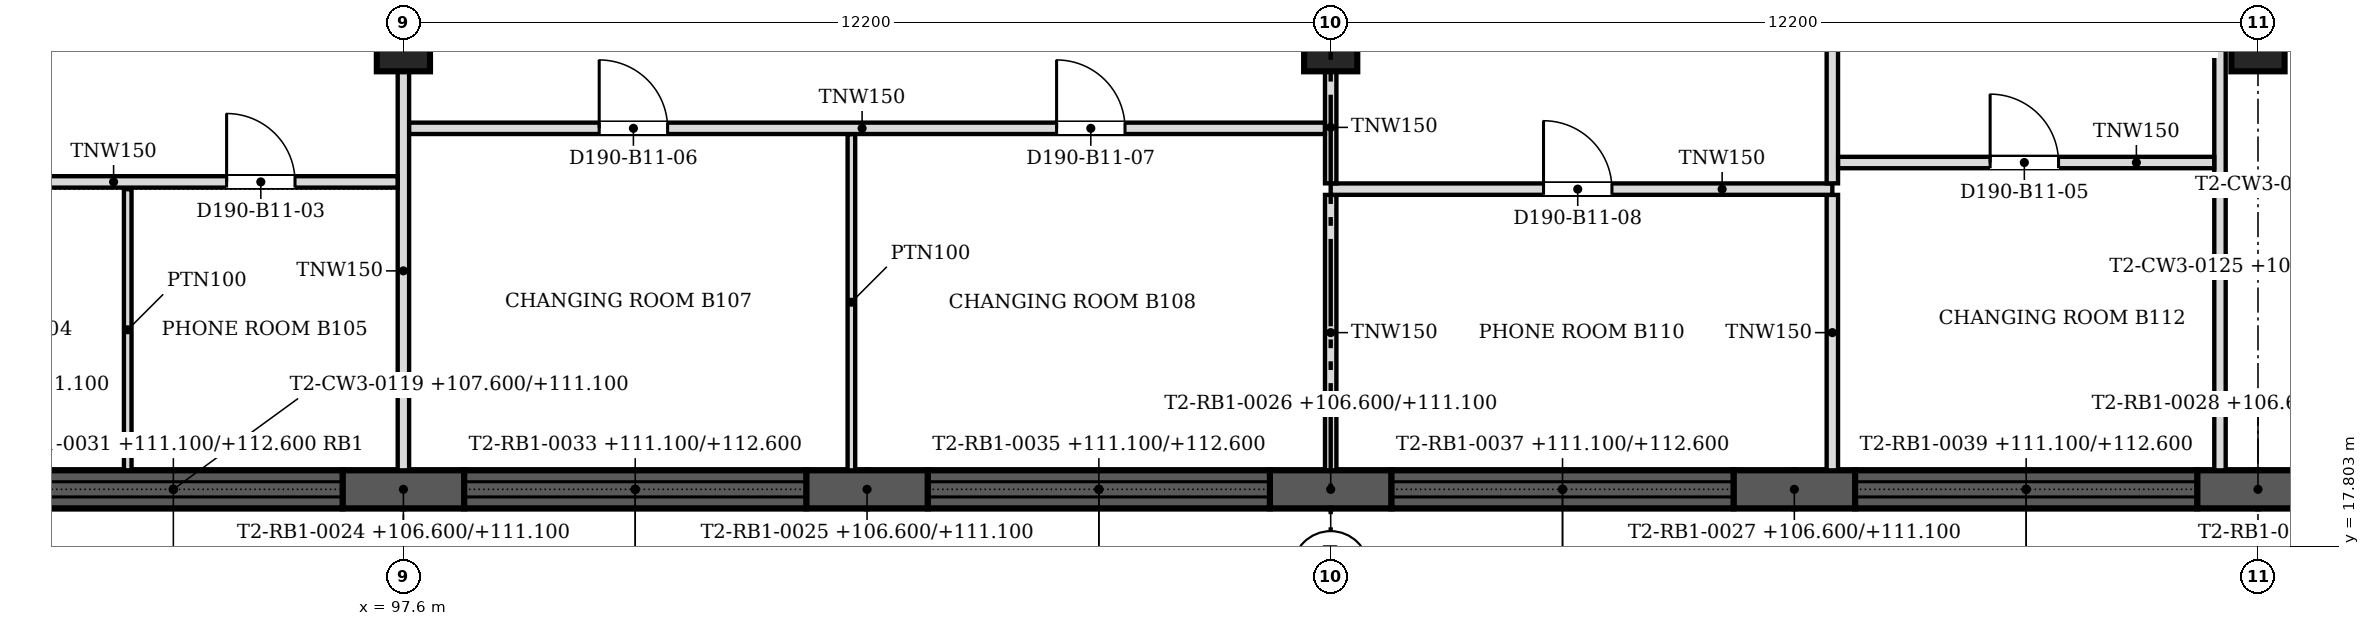
"""IFC4 building model, lengths in metres.
Left out: names, types, materials, properties, quantities, classifications, styles, units other than length and angle.
Written with IfcOpenShell. Run it as: python <this file> out.ifc"""

import sys

from ifc_helpers import new_model, si_unit, direction, frame, frame_2d, origin, origin_2d, place, context, subcontext, project, spatial, polyline, rectangle, outline, extrude, faceted_brep, source, transform, mapped, element, fill, save


model = new_model("IFC4")
c1 = context("Model", 3, precision=1e-05, world=origin(), true_north=direction((0.0, 1.0)))
c2 = subcontext(c1, "Body", "Model", "MODEL_VIEW")
j1 = project(units=[si_unit("LENGTHUNIT", "METRE"), si_unit("PLANEANGLEUNIT", "RADIAN")], contexts=[c1])
p1 = place(None, origin())
s1 = spatial("IfcSite", under=j1, at=p1, CompositionType="ELEMENT")
p2 = place(p1, origin())
s2 = spatial("IfcBuilding", under=s1, at=p2, CompositionType="ELEMENT")
p3 = place(p2, frame((0.0, 0.0, 106.6)))
s3 = spatial("IfcBuildingStorey", under=s2, at=p3, CompositionType="ELEMENT", Elevation=106.6)
for number, where, z_axis, x_axis in (
    (1, (97.6, 24.4, 0.0), (0.0, 0.0, 1.0), (1.0, 0.0, 0.0)),
    (2, (109.8, 24.4, 0.0), (0.0, 0.0, 1.0), (1.0, 0.0, 0.0)),
    (3, (122.0, 24.4, 0.0), (0.0, 0.0, 1.0), (1.0, 0.0, 0.0)),
):
    element("IfcColumn", number, at=place(p3, frame(where, z_axis=z_axis, x_axis=x_axis)), inside=s3, PredefinedType="COLUMN", context=c2, shape_type="SweptSolid", body=[
        extrude(rectangle(XDim=0.7, YDim=0.7, at=origin_2d()), origin(), (0.0, 0.0, 1.0), 5.7),
    ])
m1 = source(origin(), c2, "Body", "Brep", [
    faceted_brep([(0.0, -0.25, 0.0), (1.6, -0.25, 0.0), (1.6, -0.25, 4.5), (0.0, -0.25, 4.5), (0.0, 0.25, 4.5), (1.6, 0.25, 4.5), (1.6, 0.25, 0.0), (0.0, 0.25, 0.0)], [[[0, 1, 2, 3]], [[4, 5, 6, 7]], [[7, 6, 1, 0]], [[5, 4, 3, 2]], [[4, 7, 0, 3]], [[1, 6, 5, 2]]]),
])
p4 = place(p3, frame((96.8, 18.55, 0.0), z_axis=(0.0, 0.0, 1.0), x_axis=(1.0, 0.0, 0.0)))
e4 = element("IfcWall", 4, at=p4, inside=s3, PredefinedType="SOLIDWALL", context=c2, shape_type="MappedRepresentation", body=[
    mapped(m1, transform((0.0, 0.0, 0.0), scale=1.0)),
])
m2 = source(origin(), c2, "Body", "SweptSolid", [
    extrude(outline(polyline([(0.0, 0.0), (1.6, 0.0), (1.6, 4.5), (0.0, 4.5), (0.0, 0.0)])), frame((0.0, 0.25, 0.0), z_axis=(0.0, -1.0, 0.0), x_axis=(1.0, 0.0, 0.0)), (0.0, 0.0, 1.0), 0.5),
])
for number, where, z_axis, x_axis in (
    (5, (102.9, 18.55, 0.0), (0.0, 0.0, 1.0), (1.0, 0.0, 0.0)),
    (6, (109.0, 18.55, 0.0), (0.0, 0.0, 1.0), (1.0, 0.0, 0.0)),
):
    element("IfcWall", number, at=place(p3, frame(where, z_axis=z_axis, x_axis=x_axis)), inside=s3, PredefinedType="SOLIDWALL", context=c2, shape_type="MappedRepresentation", body=[
        mapped(m2, transform((0.0, 0.0, 0.0), scale=1.0)),
    ])
p5 = place(p3, frame((115.1, 18.55, 0.0), z_axis=(0.0, 0.0, 1.0), x_axis=(1.0, 0.0, 0.0)))
e7 = element("IfcWall", 7, at=p5, inside=s3, PredefinedType="SOLIDWALL", context=c2, shape_type="MappedRepresentation", body=[
    mapped(m1, transform((0.0, 0.0, 0.0), scale=1.0)),
])
p6 = place(p3, frame((121.2, 18.55, 0.0), z_axis=(0.0, 0.0, 1.0), x_axis=(1.0, 0.0, 0.0)))
e8 = element("IfcWall", 8, at=p6, inside=s3, PredefinedType="SOLIDWALL", context=c2, shape_type="MappedRepresentation", body=[
    mapped(m2, transform((0.0, 0.0, 0.0), scale=1.0)),
])
m3 = source(origin(), c2, "Body", "SweptSolid", [
    extrude(outline(polyline([(0.0, 0.0), (4.453, 0.0), (4.453, 1.0), (0.0, 1.0), (0.0, 0.0)])), frame((0.0, 0.25, 0.0), z_axis=(0.0, -1.0, 0.0), x_axis=(1.0, 0.0, 0.0)), (0.0, 0.0, 1.0), 0.5),
])
p7 = place(p3, frame((92.346, 18.55, 0.0), z_axis=(0.0, 0.0, 1.0), x_axis=(1.0, 0.0, 0.0)))
e9 = element("IfcWall", 9, at=p7, inside=s3, PredefinedType="SOLIDWALL", context=c2, shape_type="MappedRepresentation", body=[
    mapped(m3, transform((0.0, 0.0, 0.0), scale=1.0)),
])
m4 = source(origin(), c2, "Body", "Brep", [
    faceted_brep([(0.0, -0.25, 0.0), (6.053, -0.25, 0.0), (6.053, -0.25, 1.5), (0.0, -0.25, 1.5), (0.047, 0.25, 1.5), (6.053, 0.25, 1.5), (6.053, 0.25, 0.0), (0.047, 0.25, 0.0), (0.0, 0.0, 0.0), (0.0, 0.0, 1.5)], [[[0, 1, 2, 3]], [[4, 5, 6, 7]], [[7, 6, 1, 0, 8]], [[5, 4, 9, 3, 2]], [[8, 0, 3, 9]], [[7, 8, 9, 4]], [[1, 6, 5, 2]]]),
])
p8 = place(p3, frame((91.547, 18.55, 4.5), z_axis=(0.0, 0.0, 1.0), x_axis=(1.0, 0.0, 0.0)))
e10 = element("IfcWall", 10, at=p8, inside=s3, PredefinedType="SOLIDWALL", context=c2, shape_type="MappedRepresentation", body=[
    mapped(m4, transform((0.0, 0.0, 0.0), scale=1.0)),
])
m5 = source(origin(), c2, "Body", "SweptSolid", [
    extrude(outline(polyline([(0.0, 0.0), (4.5, 0.0), (4.5, 1.0), (0.0, 1.0), (0.0, 0.0)])), frame((0.0, 0.25, 0.0), z_axis=(0.0, -1.0, 0.0), x_axis=(1.0, 0.0, 0.0)), (0.0, 0.0, 1.0), 0.5),
])
p9 = place(p3, frame((98.4, 18.55, 0.0), z_axis=(0.0, 0.0, 1.0), x_axis=(1.0, 0.0, 0.0)))
e11 = element("IfcWall", 11, at=p9, inside=s3, PredefinedType="SOLIDWALL", context=c2, shape_type="MappedRepresentation", body=[
    mapped(m5, transform((0.0, 0.0, 0.0), scale=1.0)),
])
m6 = source(origin(), c2, "Body", "Brep", [
    faceted_brep([(0.0, -0.25, 0.0), (6.1, -0.25, 0.0), (6.1, -0.25, 1.5), (0.0, -0.25, 1.5), (0.0, 0.25, 1.5), (6.1, 0.25, 1.5), (6.1, 0.25, 0.0), (0.0, 0.25, 0.0)], [[[0, 1, 2, 3]], [[4, 5, 6, 7]], [[7, 6, 1, 0]], [[5, 4, 3, 2]], [[4, 7, 0, 3]], [[1, 6, 5, 2]]]),
])
p10 = place(p3, frame((97.6, 18.55, 4.5), z_axis=(0.0, 0.0, 1.0), x_axis=(1.0, 0.0, 0.0)))
e12 = element("IfcWall", 12, at=p10, inside=s3, PredefinedType="SOLIDWALL", context=c2, shape_type="MappedRepresentation", body=[
    mapped(m6, transform((0.0, 0.0, 0.0), scale=1.0)),
])
p11 = place(p3, frame((104.5, 18.55, 0.0), z_axis=(0.0, 0.0, 1.0), x_axis=(1.0, 0.0, 0.0)))
e13 = element("IfcWall", 13, at=p11, inside=s3, PredefinedType="SOLIDWALL", context=c2, shape_type="MappedRepresentation", body=[
    mapped(m5, transform((0.0, 0.0, 0.0), scale=1.0)),
])
m7 = source(origin(), c2, "Body", "SweptSolid", [
    extrude(outline(polyline([(0.0, 0.0), (6.1, 0.0), (6.1, 1.5), (0.0, 1.5), (0.0, 0.0)])), frame((0.0, 0.25, 0.0), z_axis=(0.0, -1.0, 0.0), x_axis=(1.0, 0.0, 0.0)), (0.0, 0.0, 1.0), 0.5),
])
p12 = place(p3, frame((103.7, 18.55, 4.5), z_axis=(0.0, 0.0, 1.0), x_axis=(1.0, 0.0, 0.0)))
e14 = element("IfcWall", 14, at=p12, inside=s3, PredefinedType="SOLIDWALL", context=c2, shape_type="MappedRepresentation", body=[
    mapped(m7, transform((0.0, 0.0, 0.0), scale=1.0)),
])
p13 = place(p3, frame((110.6, 18.55, 0.0), z_axis=(0.0, 0.0, 1.0), x_axis=(1.0, 0.0, 0.0)))
e15 = element("IfcWall", 15, at=p13, inside=s3, PredefinedType="SOLIDWALL", context=c2, shape_type="MappedRepresentation", body=[
    mapped(m5, transform((0.0, 0.0, 0.0), scale=1.0)),
])
p14 = place(p3, frame((109.8, 18.55, 4.5), z_axis=(0.0, 0.0, 1.0), x_axis=(1.0, 0.0, 0.0)))
e16 = element("IfcWall", 16, at=p14, inside=s3, PredefinedType="SOLIDWALL", context=c2, shape_type="MappedRepresentation", body=[
    mapped(m6, transform((0.0, 0.0, 0.0), scale=1.0)),
])
p15 = place(p3, frame((116.7, 18.55, 0.0), z_axis=(0.0, 0.0, 1.0), x_axis=(1.0, 0.0, 0.0)))
e17 = element("IfcWall", 17, at=p15, inside=s3, PredefinedType="SOLIDWALL", context=c2, shape_type="MappedRepresentation", body=[
    mapped(m5, transform((0.0, 0.0, 0.0), scale=1.0)),
])
p16 = place(p3, frame((115.9, 18.55, 4.5), z_axis=(0.0, 0.0, 1.0), x_axis=(1.0, 0.0, 0.0)))
e18 = element("IfcWall", 18, at=p16, inside=s3, PredefinedType="SOLIDWALL", context=c2, shape_type="MappedRepresentation", body=[
    mapped(m7, transform((0.0, 0.0, 0.0), scale=1.0)),
])
m8 = source(origin(), c2, "Body", "Brep", [
    faceted_brep([(0.0, -0.25, 0.0), (2.8, -0.25, 0.0), (2.8, -0.25, 1.5), (0.0, -0.25, 1.5), (0.0, 0.25, 1.5), (2.55, 0.25, 1.5), (2.55, 0.25, 0.0), (0.0, 0.25, 0.0), (2.8, 0.0, 0.0), (2.8, 0.0, 1.5)], [[[0, 1, 2, 3]], [[4, 5, 6, 7]], [[7, 6, 8, 1, 0]], [[9, 2, 1, 8]], [[5, 4, 3, 2, 9]], [[4, 7, 0, 3]], [[8, 6, 5, 9]]]),
])
p17 = place(p3, frame((122.0, 18.55, 4.5), z_axis=(0.0, 0.0, 1.0), x_axis=(1.0, 0.0, 0.0)))
e19 = element("IfcWall", 19, at=p17, inside=s3, PredefinedType="SOLIDWALL", context=c2, shape_type="MappedRepresentation", body=[
    mapped(m8, transform((0.0, 0.0, 0.0), scale=1.0)),
])
p18 = place(p3, frame((93.973, 18.8, 0.0), z_axis=(0.0, 0.0, 1.0), x_axis=(0.0, 1.0, 0.0)))
e20 = element("IfcWall", 20, at=p18, inside=s3, PredefinedType="PARTITIONING", context=c2, shape_type="SweptSolid", body=[
    extrude(rectangle(XDim=3.699, YDim=0.1, at=frame_2d((1.85, 0.0))), origin(), (0.0, 0.0, 1.0), 5.167),
])
p19 = place(p3, frame((97.6, 18.8, 0.0), z_axis=(0.0, 0.0, 1.0), x_axis=(0.0, 1.0, 0.0)))
e21 = element("IfcWall", 21, at=p19, inside=s3, PredefinedType="PARTITIONING", context=c2, shape_type="SweptSolid", body=[
    extrude(rectangle(XDim=5.249, YDim=0.15, at=frame_2d((2.625, 0.0))), origin(), (0.0, 0.0, 1.0), 5.167),
])
p20 = place(p3, frame((103.494, 18.8, 0.0), z_axis=(0.0, 0.0, 1.0), x_axis=(0.0, 1.0, 0.0)))
e22 = element("IfcWall", 22, at=p20, inside=s3, PredefinedType="PARTITIONING", context=c2, shape_type="SweptSolid", body=[
    extrude(rectangle(XDim=4.424, YDim=0.1, at=frame_2d((2.212, 0.0))), origin(), (0.0, 0.0, 1.0), 5.167),
])
for number, where, z_axis, x_axis in (
    (23, (109.8, 18.8, 0.0), (0.0, 0.0, 1.0), (0.0, 1.0, 0.0)),
    (24, (116.4, 18.8, 0.0), (0.0, 0.0, 1.0), (0.0, 1.0, 0.0)),
):
    element("IfcWall", number, at=place(p3, frame(where, z_axis=z_axis, x_axis=x_axis)), inside=s3, PredefinedType="PARTITIONING", context=c2, shape_type="SweptSolid", body=[
        extrude(rectangle(XDim=3.624, YDim=0.15, at=frame_2d((1.812, 0.0))), origin(), (0.0, 0.0, 1.0), 5.167),
    ])
p21 = place(p3, frame((121.5, 18.8, 0.0), z_axis=(0.0, 0.0, 1.0), x_axis=(0.0, 1.0, 0.0)))
e25 = element("IfcWall", 25, at=p21, inside=s3, PredefinedType="PARTITIONING", context=c2, shape_type="SweptSolid", body=[
    extrude(rectangle(XDim=15.324, YDim=0.15, at=frame_2d((7.662, 0.0))), origin(), (0.0, 0.0, 1.0), 5.167),
])
p22 = place(p3, frame((116.4, 22.5, 0.0), z_axis=(0.0, 0.0, 1.0), x_axis=(-1.0, 0.0, 0.0)))
e26 = element("IfcWall", 26, at=p22, inside=s3, PredefinedType="PARTITIONING", context=c2, shape_type="SweptSolid", body=[
    extrude(rectangle(XDim=6.6, YDim=0.15, at=frame_2d((3.3, 0.0))), origin(), (0.0, 0.0, 1.0), 5.167),
])
m9 = source(origin(), c2, "Body", "SweptSolid", [
    extrude(rectangle(XDim=0.9, YDim=2.1, at=frame_2d((0.45, 1.05))), frame((0.0, 0.085, 0.0), z_axis=(0.0, -1.0, 0.0), x_axis=(1.0, 0.0, 0.0)), (0.0, 0.0, 1.0), 0.17),
])
p23 = place(p22, frame((2.9, 0.0, 0.0)))
e27 = element("IfcOpeningElement", 27, at=p23, cuts=e26, PredefinedType="OPENING", context=c2, shape_type="MappedRepresentation", body=[
    mapped(m9, transform((0.0, 0.0, 0.0), scale=1.0)),
])
p24 = place(p3, frame((97.524, 22.595, 0.0), z_axis=(0.0, 0.0, 1.0), x_axis=(-1.0, 0.0, 0.0)))
e28 = element("IfcWall", 28, at=p24, inside=s3, PredefinedType="PARTITIONING", context=c2, shape_type="SweptSolid", body=[
    extrude(rectangle(XDim=10.884, YDim=0.15, at=frame_2d((5.442, 0.0))), origin(), (0.0, 0.0, 1.0), 5.167),
])
p25 = place(p24, frame((8.884, 0.0, 0.0)))
e29 = element("IfcOpeningElement", 29, at=p25, cuts=e28, PredefinedType="OPENING", context=c2, shape_type="MappedRepresentation", body=[
    mapped(m9, transform((0.0, 0.0, 0.0), scale=1.0)),
])
p26 = place(p24, frame((1.35, 0.0, 0.0)))
e30 = element("IfcOpeningElement", 30, at=p26, cuts=e28, PredefinedType="OPENING", context=c2, shape_type="MappedRepresentation", body=[
    mapped(m9, transform((0.0, 0.0, 0.0), scale=1.0)),
])
p27 = place(p24, frame((5.224, 0.0, 0.0)))
e31 = element("IfcOpeningElement", 31, at=p27, cuts=e28, PredefinedType="OPENING", context=c2, shape_type="MappedRepresentation", body=[
    mapped(m9, transform((0.0, 0.0, 0.0), scale=1.0)),
])
p28 = place(p3, frame((109.8, 22.576, 0.0), z_axis=(0.0, 0.0, 1.0), x_axis=(0.0, 1.0, 0.0)))
e32 = element("IfcWall", 32, at=p28, inside=s3, PredefinedType="PARTITIONING", context=c2, shape_type="SweptSolid", body=[
    extrude(rectangle(XDim=1.473, YDim=0.15, at=frame_2d((0.737, 0.0))), origin(), (0.0, 0.0, 1.0), 5.167),
])
p29 = place(p3, frame((116.4, 22.576, 0.0), z_axis=(0.0, 0.0, 1.0), x_axis=(0.0, 1.0, 0.0)))
e33 = element("IfcWall", 33, at=p29, inside=s3, PredefinedType="PARTITIONING", context=c2, shape_type="SweptSolid", body=[
    extrude(rectangle(XDim=11.548, YDim=0.15, at=frame_2d((5.774, 0.0))), origin(), (0.0, 0.0, 1.0), 5.167),
])
p30 = place(p3, frame((121.424, 22.85, 0.0), z_axis=(0.0, 0.0, 1.0), x_axis=(-1.0, 0.0, 0.0)))
e34 = element("IfcWall", 34, at=p30, inside=s3, PredefinedType="PARTITIONING", context=c2, shape_type="SweptSolid", body=[
    extrude(rectangle(XDim=4.948, YDim=0.15, at=frame_2d((2.474, 0.0))), origin(), (0.0, 0.0, 1.0), 5.167),
])
p31 = place(p30, frame((2.048, 0.0, 0.0)))
e35 = element("IfcOpeningElement", 35, at=p31, cuts=e34, PredefinedType="OPENING", context=c2, shape_type="MappedRepresentation", body=[
    mapped(m9, transform((0.0, 0.0, 0.0), scale=1.0)),
])
p32 = place(p3, frame((109.724, 23.3, 0.0), z_axis=(0.0, 0.0, 1.0), x_axis=(-1.0, 0.0, 0.0)))
e36 = element("IfcWall", 36, at=p32, inside=s3, PredefinedType="PARTITIONING", context=c2, shape_type="SweptSolid", body=[
    extrude(rectangle(XDim=12.048, YDim=0.15, at=frame_2d((6.024, 0.0))), origin(), (0.0, 0.0, 1.0), 5.167),
])
p33 = place(p32, frame((8.648, 0.0, 0.0)))
e37 = element("IfcOpeningElement", 37, at=p33, cuts=e36, PredefinedType="OPENING", context=c2, shape_type="MappedRepresentation", body=[
    mapped(m9, transform((0.0, 0.0, 0.0), scale=1.0)),
])
p34 = place(p32, frame((2.63, 0.0, 0.0)))
e38 = element("IfcOpeningElement", 38, at=p34, cuts=e36, PredefinedType="OPENING", context=c2, shape_type="MappedRepresentation", body=[
    mapped(m9, transform((0.0, 0.0, 0.0), scale=1.0)),
])
m10 = source(origin(), c2, "Body", "SweptSolid", [
    extrude(rectangle(XDim=0.9, YDim=2.1, at=frame_2d((0.45, 1.05))), frame((0.0, 0.025, 0.0), z_axis=(0.0, -1.0, 0.0), x_axis=(1.0, 0.0, 0.0)), (0.0, 0.0, 1.0), 0.05),
])
p35 = place(p26, origin())
e39 = element("IfcDoor", 39, at=p35, inside=s3, OperationType="SINGLE_SWING_RIGHT", PredefinedType="DOOR", context=c2, shape_type="MappedRepresentation", body=[
    mapped(m10, transform((0.0, 0.0, 0.0), scale=1.0)),
])
fill(e30, e39)
p36 = place(p31, origin())
e40 = element("IfcDoor", 40, at=p36, inside=s3, OperationType="SINGLE_SWING_RIGHT", PredefinedType="DOOR", context=c2, shape_type="MappedRepresentation", body=[
    mapped(m10, transform((0.0, 0.0, 0.0), scale=1.0)),
])
fill(e35, e40)
p37 = place(p33, origin())
e41 = element("IfcDoor", 41, at=p37, inside=s3, OperationType="SINGLE_SWING_RIGHT", PredefinedType="DOOR", context=c2, shape_type="MappedRepresentation", body=[
    mapped(m10, transform((0.0, 0.0, 0.0), scale=1.0)),
])
fill(e37, e41)
p38 = place(p34, origin())
e42 = element("IfcDoor", 42, at=p38, inside=s3, OperationType="SINGLE_SWING_RIGHT", PredefinedType="DOOR", context=c2, shape_type="MappedRepresentation", body=[
    mapped(m10, transform((0.0, 0.0, 0.0), scale=1.0)),
])
fill(e38, e42)
p39 = place(p23, origin())
e43 = element("IfcDoor", 43, at=p39, inside=s3, OperationType="SINGLE_SWING_RIGHT", PredefinedType="DOOR", context=c2, shape_type="MappedRepresentation", body=[
    mapped(m10, transform((0.0, 0.0, 0.0), scale=1.0)),
])
fill(e27, e43)
save(model, sys.argv[1])
